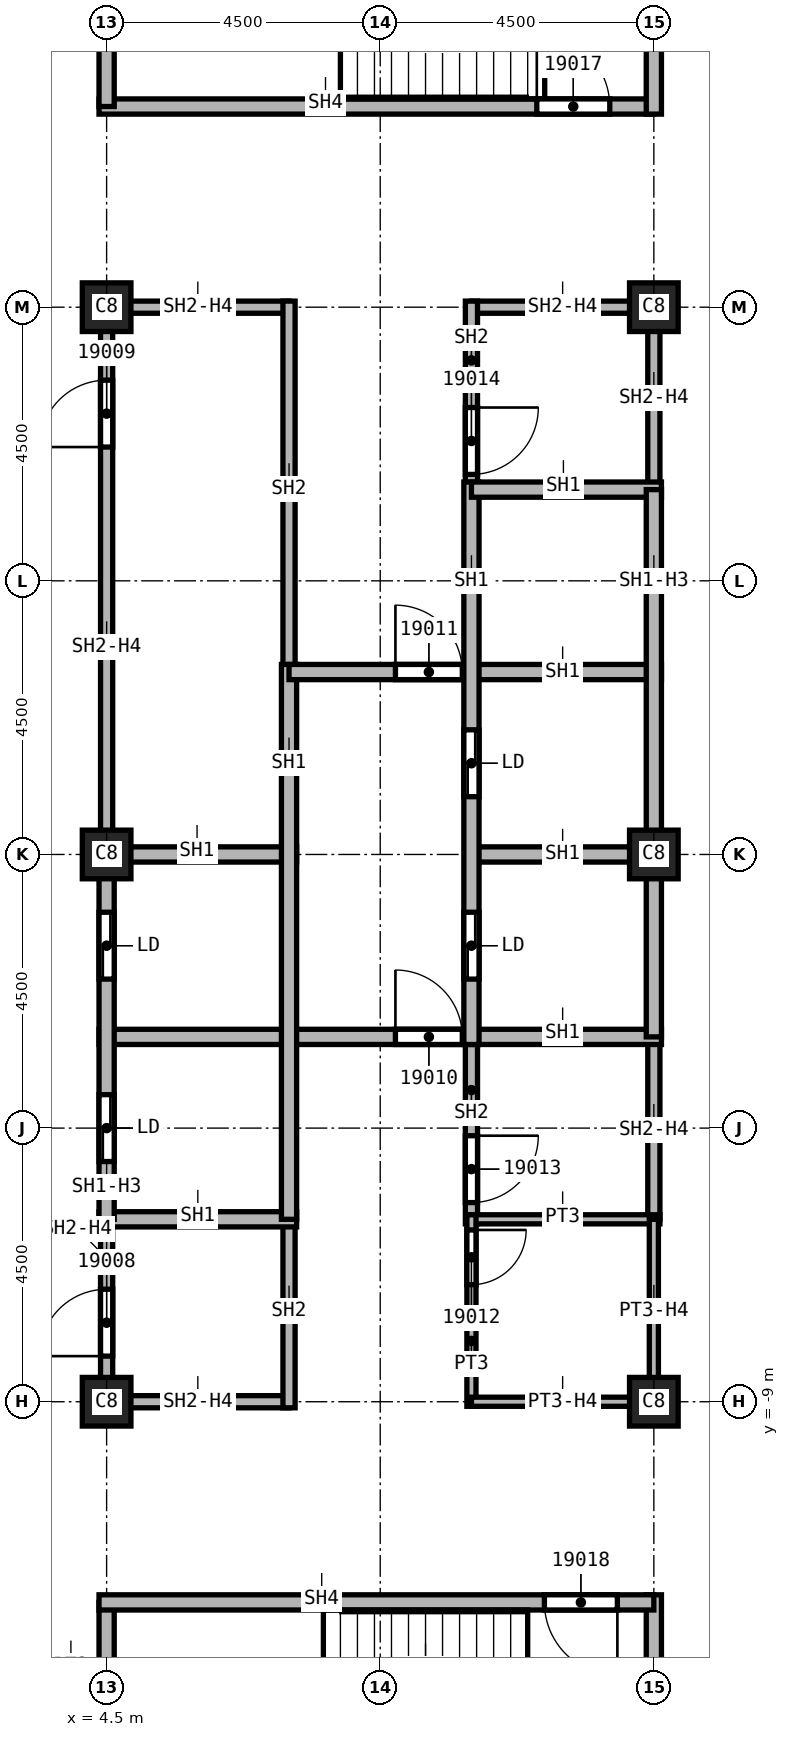
"""IFC4 building model, lengths in metres.
Left out: names, types, materials, properties, quantities, classifications, styles, units other than length and angle.
Written with IfcOpenShell. Run it as: python <this file> out.ifc"""

import sys

from ifc_helpers import new_model, si_unit, direction, frame, frame_2d, origin, origin_2d, place, context, subcontext, project, spatial, rectangle, extrude, element, fill, save


model = new_model("IFC4")
c1 = context("Model", 3, precision=1e-05, world=origin(), true_north=direction((0.0, 1.0)))
c2 = subcontext(c1, "Body", "Model", "MODEL_VIEW")
j1 = project(units=[si_unit("LENGTHUNIT", "METRE"), si_unit("PLANEANGLEUNIT", "RADIAN")], contexts=[c1])
p1 = place(None, origin())
s1 = spatial("IfcSite", under=j1, at=p1, CompositionType="ELEMENT")
p2 = place(p1, origin())
s2 = spatial("IfcBuilding", under=s1, at=p2, CompositionType="ELEMENT")
p3 = place(p2, frame((0.0, 0.0, 278.0)))
s3 = spatial("IfcBuildingStorey", under=s2, at=p3, CompositionType="ELEMENT", Elevation=278.0)
for number, where, z_axis, x_axis in (
    (1, (4.5, 0.0, 0.0), (0.0, 0.0, 1.0), (1.0, 0.0, 0.0)),
    (2, (4.5, 9.0, 0.0), (0.0, 0.0, 1.0), (1.0, 0.0, 0.0)),
    (3, (4.5, -9.0, 0.0), (0.0, 0.0, 1.0), (1.0, 0.0, 0.0)),
    (4, (13.5, 0.0, 0.0), (0.0, 0.0, 1.0), (1.0, 0.0, 0.0)),
    (5, (13.5, 9.0, 0.0), (0.0, 0.0, 1.0), (1.0, 0.0, 0.0)),
    (6, (13.5, -9.0, 0.0), (0.0, 0.0, 1.0), (1.0, 0.0, 0.0)),
):
    element("IfcColumn", number, at=place(p3, frame(where, z_axis=z_axis, x_axis=x_axis)), inside=s3, PredefinedType="COLUMN", context=c2, shape_type="SweptSolid", body=[
        extrude(rectangle(XDim=0.8, YDim=0.8, at=origin_2d()), origin(), (0.0, 0.0, 1.0), 3.72),
    ])
p4 = place(p3, frame((4.5, -9.1, 0.0), z_axis=(0.0, 0.0, 1.0), x_axis=(0.0, 1.0, 0.0)))
e7 = element("IfcWall", 7, at=p4, inside=s3, PredefinedType="SOLIDWALL", context=c2, shape_type="SweptSolid", body=[
    extrude(rectangle(XDim=3.1, YDim=0.2, at=frame_2d((1.55, 0.0))), origin(), (0.0, 0.0, 1.0), 3.042),
])
p5 = place(p4, frame((0.85, 0.0, 0.0)))
e8 = element("IfcOpeningElement", 8, at=p5, cuts=e7, PredefinedType="OPENING", context=c2, shape_type="SweptSolid", body=[
    extrude(rectangle(XDim=1.1, YDim=2.1, at=frame_2d((0.55, 1.05))), frame((0.0, 0.1, 0.0), z_axis=(0.0, -1.0, 0.0), x_axis=(1.0, 0.0, 0.0)), (0.0, 0.0, 1.0), 0.2),
])
p6 = place(p3, frame((4.5, 0.0, 0.0), z_axis=(0.0, 0.0, 1.0), x_axis=(0.0, 1.0, 0.0)))
e9 = element("IfcWall", 9, at=p6, inside=s3, PredefinedType="SOLIDWALL", context=c2, shape_type="SweptSolid", body=[
    extrude(rectangle(XDim=9.1, YDim=0.2, at=frame_2d((4.55, 0.0))), origin(), (0.0, 0.0, 1.0), 3.042),
])
p7 = place(p6, frame((6.7, 0.0, 0.0)))
e10 = element("IfcOpeningElement", 10, at=p7, cuts=e9, PredefinedType="OPENING", context=c2, shape_type="SweptSolid", body=[
    extrude(rectangle(XDim=1.1, YDim=2.1, at=frame_2d((0.55, 1.05))), frame((0.0, 0.1, 0.0), z_axis=(0.0, -1.0, 0.0), x_axis=(1.0, 0.0, 0.0)), (0.0, 0.0, 1.0), 0.2),
])
for number, where, z_axis, x_axis in (
    (11, (4.5, 9.0, 0.0), (0.0, 0.0, 1.0), (1.0, 0.0, 0.0)),
    (12, (7.5, -9.0, 0.0), (0.0, 0.0, 1.0), (-1.0, 0.0, 0.0)),
):
    element("IfcWall", number, at=place(p3, frame(where, z_axis=z_axis, x_axis=x_axis)), inside=s3, PredefinedType="SOLIDWALL", context=c2, shape_type="SweptSolid", body=[
        extrude(rectangle(XDim=3.0, YDim=0.2, at=frame_2d((1.5, 0.0))), origin(), (0.0, 0.0, 1.0), 3.042),
    ])
p8 = place(p3, frame((7.5, -6.0, 0.0), z_axis=(0.0, 0.0, 1.0), x_axis=(0.0, -1.0, 0.0)))
e13 = element("IfcWall", 13, at=p8, inside=s3, PredefinedType="SOLIDWALL", context=c2, shape_type="SweptSolid", body=[
    extrude(rectangle(XDim=3.1, YDim=0.2, at=frame_2d((1.55, 0.0))), origin(), (0.0, 0.0, 1.0), 3.72),
])
p9 = place(p3, frame((7.5, 9.1, 0.0), z_axis=(0.0, 0.0, 1.0), x_axis=(0.0, -1.0, 0.0)))
e14 = element("IfcWall", 14, at=p9, inside=s3, PredefinedType="SOLIDWALL", context=c2, shape_type="SweptSolid", body=[
    extrude(rectangle(XDim=6.225, YDim=0.2, at=frame_2d((3.113, 0.0))), origin(), (0.0, 0.0, 1.0), 3.72),
])
p10 = place(p3, frame((10.5, -2.875, 0.0), z_axis=(0.0, 0.0, 1.0), x_axis=(0.0, -1.0, 0.0)))
e15 = element("IfcWall", 15, at=p10, inside=s3, PredefinedType="SOLIDWALL", context=c2, shape_type="SweptSolid", body=[
    extrude(rectangle(XDim=3.2, YDim=0.2, at=frame_2d((1.6, 0.0))), origin(), (0.0, 0.0, 1.0), 3.72),
])
p11 = place(p10, frame((1.75, 0.0, 0.0)))
e16 = element("IfcOpeningElement", 16, at=p11, cuts=e15, PredefinedType="OPENING", context=c2, shape_type="SweptSolid", body=[
    extrude(rectangle(XDim=1.1, YDim=2.1, at=frame_2d((0.55, 1.05))), frame((0.0, 0.1, 0.0), z_axis=(0.0, -1.0, 0.0), x_axis=(1.0, 0.0, 0.0)), (0.0, 0.0, 1.0), 0.2),
])
p12 = place(p3, frame((10.5, 9.0, 0.0), z_axis=(0.0, 0.0, 1.0), x_axis=(1.0, 0.0, 0.0)))
e17 = element("IfcWall", 17, at=p12, inside=s3, PredefinedType="SOLIDWALL", context=c2, shape_type="SweptSolid", body=[
    extrude(rectangle(XDim=3.0, YDim=0.2, at=frame_2d((1.5, 0.0))), origin(), (0.0, 0.0, 1.0), 3.042),
])
p13 = place(p3, frame((10.5, 9.1, 0.0), z_axis=(0.0, 0.0, 1.0), x_axis=(0.0, -1.0, 0.0)))
e18 = element("IfcWall", 18, at=p13, inside=s3, PredefinedType="SOLIDWALL", context=c2, shape_type="SweptSolid", body=[
    extrude(rectangle(XDim=3.225, YDim=0.2, at=frame_2d((1.613, 0.0))), origin(), (0.0, 0.0, 1.0), 3.72),
])
p14 = place(p13, frame((1.75, 0.0, 0.0)))
e19 = element("IfcOpeningElement", 19, at=p14, cuts=e18, PredefinedType="OPENING", context=c2, shape_type="SweptSolid", body=[
    extrude(rectangle(XDim=1.1, YDim=2.1, at=frame_2d((0.55, 1.05))), frame((0.0, 0.1, 0.0), z_axis=(0.0, -1.0, 0.0), x_axis=(1.0, 0.0, 0.0)), (0.0, 0.0, 1.0), 0.2),
])
p15 = place(p3, frame((13.5, -3.0, 0.0), z_axis=(0.0, 0.0, 1.0), x_axis=(0.0, -1.0, 0.0)))
e20 = element("IfcWall", 20, at=p15, inside=s3, PredefinedType="SOLIDWALL", context=c2, shape_type="SweptSolid", body=[
    extrude(rectangle(XDim=3.0, YDim=0.2, at=frame_2d((1.5, 0.0))), origin(), (0.0, 0.0, 1.0), 3.042),
])
p16 = place(p3, frame((13.5, 9.1, 0.0), z_axis=(0.0, 0.0, 1.0), x_axis=(0.0, -1.0, 0.0)))
e21 = element("IfcWall", 21, at=p16, inside=s3, PredefinedType="SOLIDWALL", context=c2, shape_type="SweptSolid", body=[
    extrude(rectangle(XDim=3.1, YDim=0.2, at=frame_2d((1.55, 0.0))), origin(), (0.0, 0.0, 1.0), 3.042),
])
p17 = place(p3, frame((4.375, -6.0, 0.0), z_axis=(0.0, 0.0, 1.0), x_axis=(1.0, 0.0, 0.0)))
e22 = element("IfcWall", 22, at=p17, inside=s3, PredefinedType="SOLIDWALL", context=c2, shape_type="SweptSolid", body=[
    extrude(rectangle(XDim=3.25, YDim=0.25, at=frame_2d((1.625, 0.0))), origin(), (0.0, 0.0, 1.0), 3.72),
])
p18 = place(p3, frame((4.375, -3.0, 0.0), z_axis=(0.0, 0.0, 1.0), x_axis=(1.0, 0.0, 0.0)))
e23 = element("IfcWall", 23, at=p18, inside=s3, PredefinedType="SOLIDWALL", context=c2, shape_type="SweptSolid", body=[
    extrude(rectangle(XDim=9.25, YDim=0.25, at=frame_2d((4.625, 0.0))), origin(), (0.0, 0.0, 1.0), 3.72),
])
p19 = place(p18, frame((4.875, 0.0, 0.0)))
e24 = element("IfcOpeningElement", 24, at=p19, cuts=e23, PredefinedType="OPENING", context=c2, shape_type="SweptSolid", body=[
    extrude(rectangle(XDim=1.1, YDim=2.1, at=frame_2d((0.55, 1.05))), frame((0.0, 0.125, 0.0), z_axis=(0.0, -1.0, 0.0), x_axis=(1.0, 0.0, 0.0)), (0.0, 0.0, 1.0), 0.25),
])
p20 = place(p3, frame((4.375, 0.0, 0.0), z_axis=(0.0, 0.0, 1.0), x_axis=(1.0, 0.0, 0.0)))
e25 = element("IfcWall", 25, at=p20, inside=s3, PredefinedType="SOLIDWALL", context=c2, shape_type="SweptSolid", body=[
    extrude(rectangle(XDim=3.25, YDim=0.25, at=frame_2d((1.625, 0.0))), origin(), (0.0, 0.0, 1.0), 3.72),
])
p21 = place(p3, frame((4.5, -6.0, 0.0), z_axis=(0.0, 0.0, 1.0), x_axis=(0.0, 1.0, 0.0)))
e26 = element("IfcWall", 26, at=p21, inside=s3, PredefinedType="SOLIDWALL", context=c2, shape_type="SweptSolid", body=[
    extrude(rectangle(XDim=6.0, YDim=0.25, at=frame_2d((3.0, 0.0))), origin(), (0.0, 0.0, 1.0), 3.042),
])
p22 = place(p21, frame((0.95, 0.0, 0.0)))
e27 = element("IfcOpeningElement", 27, at=p22, cuts=e26, PredefinedType="OPENING", context=c2, shape_type="SweptSolid", body=[
    extrude(rectangle(XDim=1.1, YDim=2.1, at=frame_2d((0.55, 1.05))), frame((0.0, 0.125, 0.0), z_axis=(0.0, -1.0, 0.0), x_axis=(1.0, 0.0, 0.0)), (0.0, 0.0, 1.0), 0.25),
])
p23 = place(p21, frame((3.95, 0.0, 0.0)))
e28 = element("IfcOpeningElement", 28, at=p23, cuts=e26, PredefinedType="OPENING", context=c2, shape_type="SweptSolid", body=[
    extrude(rectangle(XDim=1.1, YDim=2.1, at=frame_2d((0.55, 1.05))), frame((0.0, 0.125, 0.0), z_axis=(0.0, -1.0, 0.0), x_axis=(1.0, 0.0, 0.0)), (0.0, 0.0, 1.0), 0.25),
])
p24 = place(p3, frame((7.5, 3.125, 0.0), z_axis=(0.0, 0.0, 1.0), x_axis=(0.0, -1.0, 0.0)))
e29 = element("IfcWall", 29, at=p24, inside=s3, PredefinedType="SOLIDWALL", context=c2, shape_type="SweptSolid", body=[
    extrude(rectangle(XDim=9.125, YDim=0.25, at=frame_2d((4.562, 0.0))), origin(), (0.0, 0.0, 1.0), 3.72),
])
p25 = place(p3, frame((7.5, 3.0, 0.0), z_axis=(0.0, 0.0, 1.0), x_axis=(1.0, 0.0, 0.0)))
e30 = element("IfcWall", 30, at=p25, inside=s3, PredefinedType="SOLIDWALL", context=c2, shape_type="SweptSolid", body=[
    extrude(rectangle(XDim=6.125, YDim=0.25, at=frame_2d((3.062, 0.0))), origin(), (0.0, 0.0, 1.0), 3.72),
])
p26 = place(p25, frame((1.75, 0.0, 0.0)))
e31 = element("IfcOpeningElement", 31, at=p26, cuts=e30, PredefinedType="OPENING", context=c2, shape_type="SweptSolid", body=[
    extrude(rectangle(XDim=1.1, YDim=2.1, at=frame_2d((0.55, 1.05))), frame((0.0, 0.125, 0.0), z_axis=(0.0, -1.0, 0.0), x_axis=(1.0, 0.0, 0.0)), (0.0, 0.0, 1.0), 0.25),
])
p27 = place(p3, frame((10.5, 0.0, 0.0), z_axis=(0.0, 0.0, 1.0), x_axis=(1.0, 0.0, 0.0)))
e32 = element("IfcWall", 32, at=p27, inside=s3, PredefinedType="SOLIDWALL", context=c2, shape_type="SweptSolid", body=[
    extrude(rectangle(XDim=3.125, YDim=0.25, at=frame_2d((1.562, 0.0))), origin(), (0.0, 0.0, 1.0), 3.72),
])
p28 = place(p3, frame((10.5, 6.125, 0.0), z_axis=(0.0, 0.0, 1.0), x_axis=(0.0, -1.0, 0.0)))
e33 = element("IfcWall", 33, at=p28, inside=s3, PredefinedType="SOLIDWALL", context=c2, shape_type="SweptSolid", body=[
    extrude(rectangle(XDim=9.25, YDim=0.25, at=frame_2d((4.625, 0.0))), origin(), (0.0, 0.0, 1.0), 3.72),
])
p29 = place(p28, frame((7.075, 0.0, 0.0)))
e34 = element("IfcOpeningElement", 34, at=p29, cuts=e33, PredefinedType="OPENING", context=c2, shape_type="SweptSolid", body=[
    extrude(rectangle(XDim=1.1, YDim=2.1, at=frame_2d((0.55, 1.05))), frame((0.0, 0.125, 0.0), z_axis=(0.0, -1.0, 0.0), x_axis=(1.0, 0.0, 0.0)), (0.0, 0.0, 1.0), 0.25),
])
p30 = place(p28, frame((4.075, 0.0, 0.0)))
e35 = element("IfcOpeningElement", 35, at=p30, cuts=e33, PredefinedType="OPENING", context=c2, shape_type="SweptSolid", body=[
    extrude(rectangle(XDim=1.1, YDim=2.1, at=frame_2d((0.55, 1.05))), frame((0.0, 0.125, 0.0), z_axis=(0.0, -1.0, 0.0), x_axis=(1.0, 0.0, 0.0)), (0.0, 0.0, 1.0), 0.25),
])
p31 = place(p3, frame((10.5, 6.0, 0.0), z_axis=(0.0, 0.0, 1.0), x_axis=(1.0, 0.0, 0.0)))
e36 = element("IfcWall", 36, at=p31, inside=s3, PredefinedType="SOLIDWALL", context=c2, shape_type="SweptSolid", body=[
    extrude(rectangle(XDim=3.125, YDim=0.25, at=frame_2d((1.562, 0.0))), origin(), (0.0, 0.0, 1.0), 3.72),
])
p32 = place(p3, frame((13.5, 6.0, 0.0), z_axis=(0.0, 0.0, 1.0), x_axis=(0.0, -1.0, 0.0)))
e37 = element("IfcWall", 37, at=p32, inside=s3, PredefinedType="SOLIDWALL", context=c2, shape_type="SweptSolid", body=[
    extrude(rectangle(XDim=9.0, YDim=0.25, at=frame_2d((4.5, 0.0))), origin(), (0.0, 0.0, 1.0), 3.042),
])
p33 = place(p3, frame((4.375, 12.3, 0.0), z_axis=(0.0, 0.0, 1.0), x_axis=(1.0, 0.0, 0.0)))
e38 = element("IfcWall", 38, at=p33, inside=s3, PredefinedType="SOLIDWALL", context=c2, shape_type="SweptSolid", body=[
    extrude(rectangle(XDim=9.125, YDim=0.25, at=frame_2d((4.562, 0.0))), origin(), (0.0, 0.0, 1.0), 3.72),
])
p34 = place(p33, frame((7.2, 0.0, 0.0)))
e39 = element("IfcOpeningElement", 39, at=p34, cuts=e38, PredefinedType="OPENING", context=c2, shape_type="SweptSolid", body=[
    extrude(rectangle(XDim=1.2, YDim=2.1, at=frame_2d((0.6, 1.05))), frame((0.0, 0.125, 0.0), z_axis=(0.0, -1.0, 0.0), x_axis=(1.0, 0.0, 0.0)), (0.0, 0.0, 1.0), 0.25),
])
for number, where, z_axis, x_axis in (
    (40, (4.5, -16.8, 0.0), (0.0, 0.0, 1.0), (0.0, 1.0, 0.0)),
    (41, (4.5, 12.3, 0.0), (0.0, 0.0, 1.0), (0.0, 1.0, 0.0)),
):
    element("IfcWall", number, at=place(p3, frame(where, z_axis=z_axis, x_axis=x_axis)), inside=s3, PredefinedType="SOLIDWALL", context=c2, shape_type="SweptSolid", body=[
        extrude(rectangle(XDim=4.5, YDim=0.25, at=frame_2d((2.25, 0.0))), origin(), (0.0, 0.0, 1.0), 3.72),
    ])
p35 = place(p3, frame((13.5, -16.925, 0.0), z_axis=(0.0, 0.0, 1.0), x_axis=(0.0, 1.0, 0.0)))
e42 = element("IfcWall", 42, at=p35, inside=s3, PredefinedType="SOLIDWALL", context=c2, shape_type="SweptSolid", body=[
    extrude(rectangle(XDim=4.75, YDim=0.25, at=frame_2d((2.375, 0.0))), origin(), (0.0, 0.0, 1.0), 3.72),
])
p36 = place(p3, frame((13.5, -12.3, 0.0), z_axis=(0.0, 0.0, 1.0), x_axis=(-1.0, 0.0, 0.0)))
e43 = element("IfcWall", 43, at=p36, inside=s3, PredefinedType="SOLIDWALL", context=c2, shape_type="SweptSolid", body=[
    extrude(rectangle(XDim=9.125, YDim=0.25, at=frame_2d((4.562, 0.0))), origin(), (0.0, 0.0, 1.0), 3.72),
])
p37 = place(p36, frame((0.6, 0.0, 0.0)))
e44 = element("IfcOpeningElement", 44, at=p37, cuts=e43, PredefinedType="OPENING", context=c2, shape_type="SweptSolid", body=[
    extrude(rectangle(XDim=1.2, YDim=2.1, at=frame_2d((0.6, 1.05))), frame((0.0, 0.125, 0.0), z_axis=(0.0, -1.0, 0.0), x_axis=(1.0, 0.0, 0.0)), (0.0, 0.0, 1.0), 0.25),
])
p38 = place(p3, frame((13.5, 12.175, 0.0), z_axis=(0.0, 0.0, 1.0), x_axis=(0.0, 1.0, 0.0)))
e45 = element("IfcWall", 45, at=p38, inside=s3, PredefinedType="SOLIDWALL", context=c2, shape_type="SweptSolid", body=[
    extrude(rectangle(XDim=4.75, YDim=0.25, at=frame_2d((2.375, 0.0))), origin(), (0.0, 0.0, 1.0), 3.72),
])
p39 = place(p3, frame((10.5, -6.0, 0.0), z_axis=(0.0, 0.0, 1.0), x_axis=(1.0, 0.0, 0.0)))
e46 = element("IfcWall", 46, at=p39, inside=s3, PredefinedType="PARTITIONING", context=c2, shape_type="SweptSolid", body=[
    extrude(rectangle(XDim=3.1, YDim=0.15, at=frame_2d((1.55, 0.0))), origin(), (0.0, 0.0, 1.0), 3.72),
])
p40 = place(p3, frame((10.5, -5.925, 0.0), z_axis=(0.0, 0.0, 1.0), x_axis=(0.0, -1.0, 0.0)))
e47 = element("IfcWall", 47, at=p40, inside=s3, PredefinedType="PARTITIONING", context=c2, shape_type="SweptSolid", body=[
    extrude(rectangle(XDim=3.15, YDim=0.15, at=frame_2d((1.575, 0.0))), origin(), (0.0, 0.0, 1.0), 3.72),
])
p41 = place(p40, frame((0.25, 0.0, 0.0)))
e48 = element("IfcOpeningElement", 48, at=p41, cuts=e47, PredefinedType="OPENING", context=c2, shape_type="SweptSolid", body=[
    extrude(rectangle(XDim=0.9, YDim=2.1, at=frame_2d((0.45, 1.05))), frame((0.0, 0.075, 0.0), z_axis=(0.0, -1.0, 0.0), x_axis=(1.0, 0.0, 0.0)), (0.0, 0.0, 1.0), 0.15),
])
p42 = place(p3, frame((13.5, -9.0, 0.0), z_axis=(0.0, 0.0, 1.0), x_axis=(-1.0, 0.0, 0.0)))
e49 = element("IfcWall", 49, at=p42, inside=s3, PredefinedType="PARTITIONING", context=c2, shape_type="SweptSolid", body=[
    extrude(rectangle(XDim=3.0, YDim=0.15, at=frame_2d((1.5, 0.0))), origin(), (0.0, 0.0, 1.0), 3.042),
])
p43 = place(p3, frame((13.5, -6.0, 0.0), z_axis=(0.0, 0.0, 1.0), x_axis=(0.0, -1.0, 0.0)))
e50 = element("IfcWall", 50, at=p43, inside=s3, PredefinedType="PARTITIONING", context=c2, shape_type="SweptSolid", body=[
    extrude(rectangle(XDim=3.075, YDim=0.15, at=frame_2d((1.538, 0.0))), origin(), (0.0, 0.0, 1.0), 3.042),
])
p44 = place(p5, origin())
e51 = element("IfcDoor", 51, at=p44, inside=s3, OperationType="SINGLE_SWING_LEFT", PredefinedType="DOOR", context=c2, shape_type="SweptSolid", body=[
    extrude(rectangle(XDim=1.1, YDim=2.1, at=frame_2d((0.55, 1.05))), frame((0.0, 0.025, 0.0), z_axis=(0.0, -1.0, 0.0), x_axis=(1.0, 0.0, 0.0)), (0.0, 0.0, 1.0), 0.05),
])
fill(e8, e51)
p45 = place(p7, origin())
e52 = element("IfcDoor", 52, at=p45, inside=s3, OperationType="SINGLE_SWING_RIGHT", PredefinedType="DOOR", context=c2, shape_type="SweptSolid", body=[
    extrude(rectangle(XDim=1.1, YDim=2.1, at=frame_2d((0.55, 1.05))), frame((0.0, 0.025, 0.0), z_axis=(0.0, -1.0, 0.0), x_axis=(1.0, 0.0, 0.0)), (0.0, 0.0, 1.0), 0.05),
])
fill(e10, e52)
p46 = place(p19, origin())
e53 = element("IfcDoor", 53, at=p46, inside=s3, OperationType="SINGLE_SWING_LEFT", PredefinedType="DOOR", context=c2, shape_type="SweptSolid", body=[
    extrude(rectangle(XDim=1.1, YDim=2.1, at=frame_2d((0.55, 1.05))), frame((0.0, 0.025, 0.0), z_axis=(0.0, -1.0, 0.0), x_axis=(1.0, 0.0, 0.0)), (0.0, 0.0, 1.0), 0.05),
])
fill(e24, e53)
p47 = place(p26, origin())
e54 = element("IfcDoor", 54, at=p47, inside=s3, OperationType="SINGLE_SWING_RIGHT", PredefinedType="DOOR", context=c2, shape_type="SweptSolid", body=[
    extrude(rectangle(XDim=1.1, YDim=2.1, at=frame_2d((0.55, 1.05))), frame((0.0, 0.025, 0.0), z_axis=(0.0, -1.0, 0.0), x_axis=(1.0, 0.0, 0.0)), (0.0, 0.0, 1.0), 0.05),
])
fill(e31, e54)
p48 = place(p41, origin())
e55 = element("IfcDoor", 55, at=p48, inside=s3, OperationType="SINGLE_SWING_LEFT", PredefinedType="DOOR", context=c2, shape_type="SweptSolid", body=[
    extrude(rectangle(XDim=0.9, YDim=2.1, at=frame_2d((0.45, 1.05))), frame((0.0, 0.025, 0.0), z_axis=(0.0, -1.0, 0.0), x_axis=(1.0, 0.0, 0.0)), (0.0, 0.0, 1.0), 0.05),
])
fill(e48, e55)
p49 = place(p11, origin())
e56 = element("IfcDoor", 56, at=p49, inside=s3, OperationType="SINGLE_SWING_RIGHT", PredefinedType="DOOR", context=c2, shape_type="SweptSolid", body=[
    extrude(rectangle(XDim=1.1, YDim=2.1, at=frame_2d((0.55, 1.05))), frame((0.0, 0.025, 0.0), z_axis=(0.0, -1.0, 0.0), x_axis=(1.0, 0.0, 0.0)), (0.0, 0.0, 1.0), 0.05),
])
fill(e16, e56)
p50 = place(p14, origin())
e57 = element("IfcDoor", 57, at=p50, inside=s3, OperationType="SINGLE_SWING_LEFT", PredefinedType="DOOR", context=c2, shape_type="SweptSolid", body=[
    extrude(rectangle(XDim=1.1, YDim=2.1, at=frame_2d((0.55, 1.05))), frame((0.0, 0.025, 0.0), z_axis=(0.0, -1.0, 0.0), x_axis=(1.0, 0.0, 0.0)), (0.0, 0.0, 1.0), 0.05),
])
fill(e19, e57)
p51 = place(p34, origin())
e58 = element("IfcDoor", 58, at=p51, inside=s3, OperationType="SINGLE_SWING_RIGHT", PredefinedType="DOOR", context=c2, shape_type="SweptSolid", body=[
    extrude(rectangle(XDim=1.2, YDim=2.1, at=frame_2d((0.6, 1.05))), frame((0.0, 0.025, 0.0), z_axis=(0.0, -1.0, 0.0), x_axis=(1.0, 0.0, 0.0)), (0.0, 0.0, 1.0), 0.05),
])
fill(e39, e58)
p52 = place(p37, origin())
e59 = element("IfcDoor", 59, at=p52, inside=s3, OperationType="SINGLE_SWING_LEFT", PredefinedType="DOOR", context=c2, shape_type="SweptSolid", body=[
    extrude(rectangle(XDim=1.2, YDim=2.1, at=frame_2d((0.6, 1.05))), frame((0.0, 0.025, 0.0), z_axis=(0.0, -1.0, 0.0), x_axis=(1.0, 0.0, 0.0)), (0.0, 0.0, 1.0), 0.05),
])
fill(e44, e59)
p53 = place(p22, origin())
e60 = element("IfcDoor", 60, at=p53, inside=s3, OperationType="SLIDING_TO_LEFT", PredefinedType="DOOR", context=c2, shape_type="SweptSolid", body=[
    extrude(rectangle(XDim=1.1, YDim=2.1, at=frame_2d((0.55, 1.05))), frame((0.0, 0.025, 0.0), z_axis=(0.0, -1.0, 0.0), x_axis=(1.0, 0.0, 0.0)), (0.0, 0.0, 1.0), 0.05),
])
fill(e27, e60)
p54 = place(p23, origin())
e61 = element("IfcDoor", 61, at=p54, inside=s3, OperationType="SLIDING_TO_LEFT", PredefinedType="DOOR", context=c2, shape_type="SweptSolid", body=[
    extrude(rectangle(XDim=1.1, YDim=2.1, at=frame_2d((0.55, 1.05))), frame((0.0, 0.025, 0.0), z_axis=(0.0, -1.0, 0.0), x_axis=(1.0, 0.0, 0.0)), (0.0, 0.0, 1.0), 0.05),
])
fill(e28, e61)
p55 = place(p29, origin())
e62 = element("IfcDoor", 62, at=p55, inside=s3, OperationType="SLIDING_TO_LEFT", PredefinedType="DOOR", context=c2, shape_type="SweptSolid", body=[
    extrude(rectangle(XDim=1.1, YDim=2.1, at=frame_2d((0.55, 1.05))), frame((0.0, 0.025, 0.0), z_axis=(0.0, -1.0, 0.0), x_axis=(1.0, 0.0, 0.0)), (0.0, 0.0, 1.0), 0.05),
])
fill(e34, e62)
p56 = place(p30, origin())
e63 = element("IfcDoor", 63, at=p56, inside=s3, OperationType="SLIDING_TO_LEFT", PredefinedType="DOOR", context=c2, shape_type="SweptSolid", body=[
    extrude(rectangle(XDim=1.1, YDim=2.1, at=frame_2d((0.55, 1.05))), frame((0.0, 0.025, 0.0), z_axis=(0.0, -1.0, 0.0), x_axis=(1.0, 0.0, 0.0)), (0.0, 0.0, 1.0), 0.05),
])
fill(e35, e63)
save(model, sys.argv[1])
